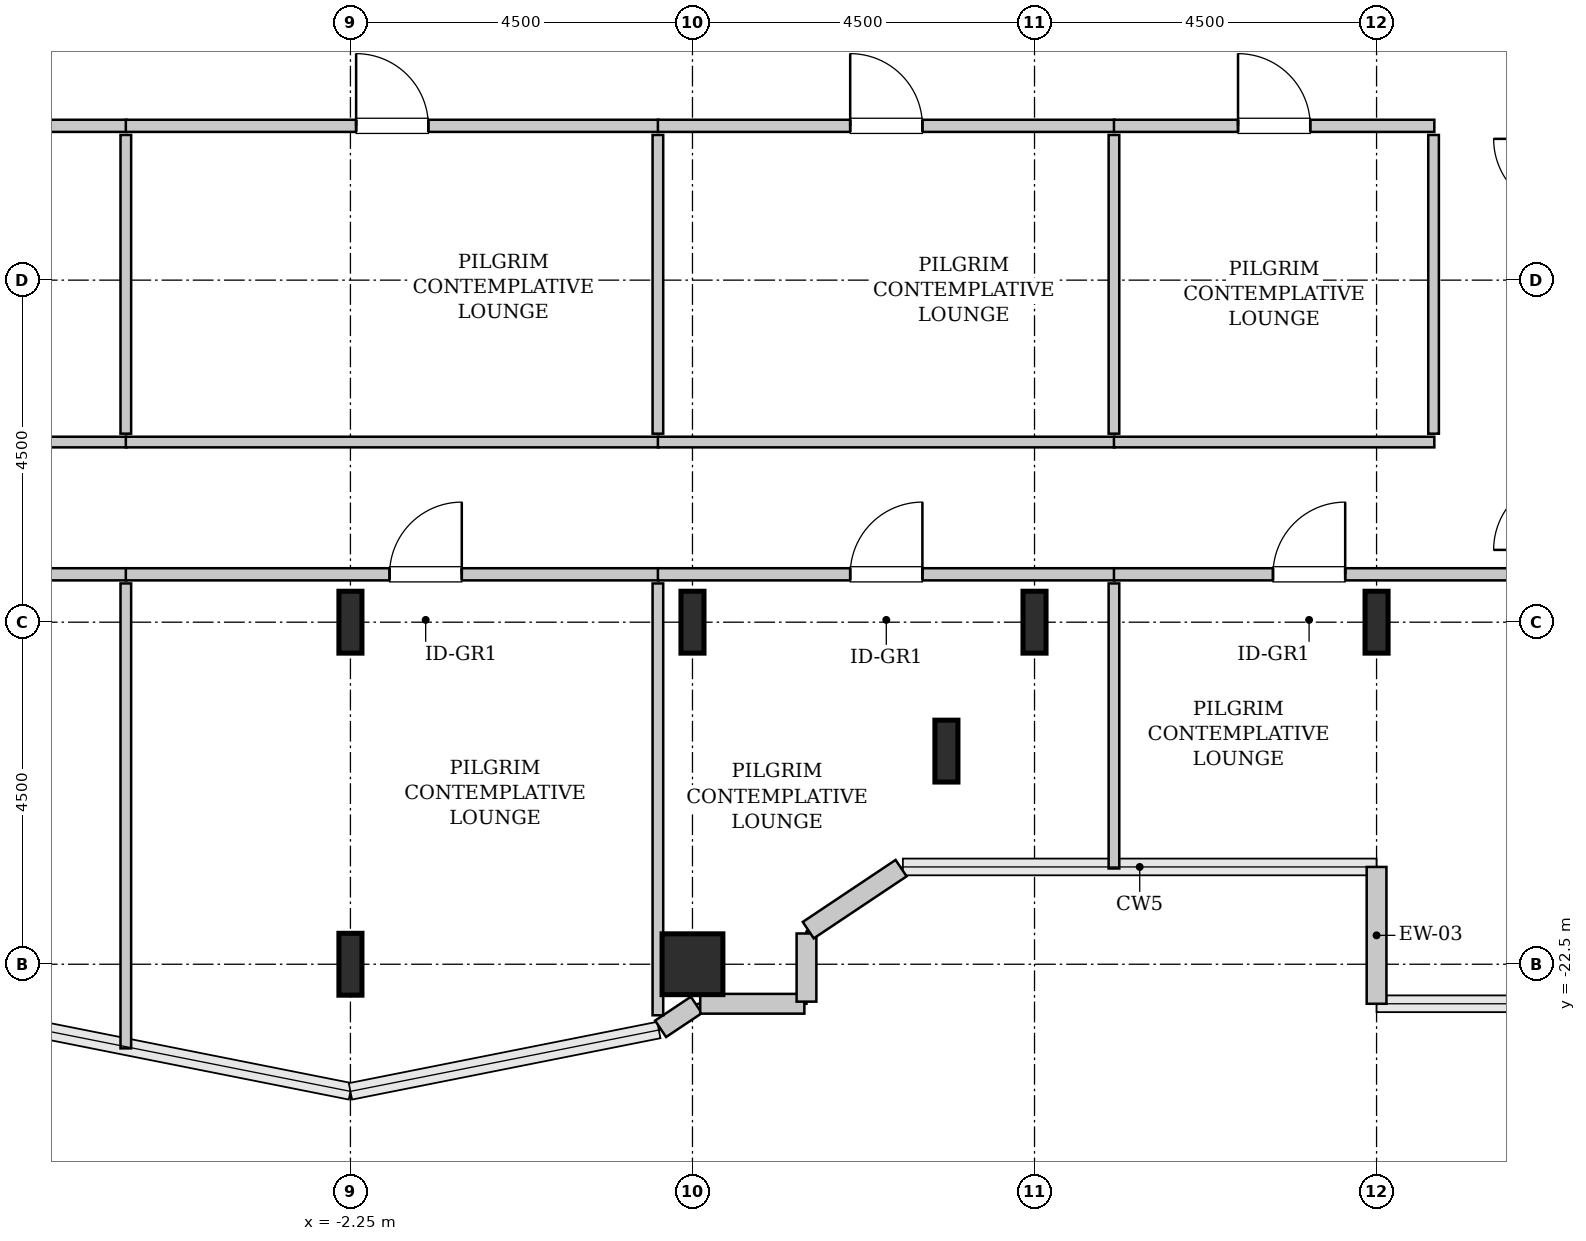
"""IFC4 building model, lengths in metres.
Left out: names, types, materials, properties, quantities, classifications, styles, units other than length and angle.
Written with IfcOpenShell. Run it as: python <this file> out.ifc"""

import sys

from ifc_helpers import new_model, si_unit, direction, frame, frame_2d, origin, origin_2d, place, context, subcontext, project, spatial, rectangle, hollow_rectangle, i_section, extrude, source, transform, mapped, element, fill, save


model = new_model("IFC4")
c1 = context("Model", 3, precision=1e-05, world=origin(), true_north=direction((0.0, 1.0)))
c2 = subcontext(c1, "Body", "Model", "MODEL_VIEW")
j1 = project(units=[si_unit("LENGTHUNIT", "METRE"), si_unit("PLANEANGLEUNIT", "RADIAN")], contexts=[c1])
p1 = place(None, origin())
s1 = spatial("IfcSite", under=j1, at=p1, CompositionType="ELEMENT")
p2 = place(p1, origin())
s2 = spatial("IfcBuilding", under=s1, at=p2, CompositionType="ELEMENT")
p3 = place(p2, frame((0.0, 0.0, 175.4)))
s3 = spatial("IfcBuildingStorey", under=s2, at=p3, CompositionType="ELEMENT", Elevation=175.4)
m1 = source(origin(), c2, "Body", "SweptSolid", [
    extrude(i_section(OverallWidth=0.303, OverallDepth=0.814, WebThickness=0.021, FlangeThickness=0.04, FilletRadius=0.03, at=origin_2d()), origin(), (0.0, 0.0, 1.0), 3.8),
])
for number, where, z_axis, x_axis in (
    (1, (-2.25, -22.5, 0.0), (0.0, 0.0, 1.0), (1.0, 0.0, 0.0)),
    (2, (-2.25, -18.0, 0.0), (0.0, 0.0, 1.0), (1.0, 0.0, 0.0)),
):
    element("IfcColumn", number, at=place(p3, frame(where, z_axis=z_axis, x_axis=x_axis)), inside=s3, PredefinedType="COLUMN", context=c2, shape_type="MappedRepresentation", body=[
        mapped(m1, transform((0.0, 0.0, 0.0), x_axis=(1.0, 0.0, 0.0), y_axis=(0.0, 1.0, 0.0), z_axis=(0.0, 0.0, 1.0), scale=1.0)),
    ])
m2 = source(origin(), c2, "Body", "SweptSolid", [
    extrude(hollow_rectangle(XDim=0.8, YDim=0.8, WallThickness=0.04, InnerFilletRadius=0.04, OuterFilletRadius=0.08, at=origin_2d()), origin(), (0.0, 0.0, 1.0), 3.8),
])
p4 = place(p3, frame((2.25, -22.5, 0.0), z_axis=(0.0, 0.0, 1.0), x_axis=(1.0, 0.0, 0.0)))
e3 = element("IfcColumn", 3, at=p4, inside=s3, PredefinedType="COLUMN", context=c2, shape_type="MappedRepresentation", body=[
    mapped(m2, transform((0.0, 0.0, 0.0), x_axis=(1.0, 0.0, 0.0), y_axis=(0.0, 1.0, 0.0), z_axis=(0.0, 0.0, 1.0), scale=1.0)),
])
for number, where, z_axis, x_axis in (
    (4, (2.25, -18.0, 0.0), (0.0, 0.0, 1.0), (1.0, 0.0, 0.0)),
    (5, (5.591, -19.696, 0.0), (0.0, 0.0, 1.0), (1.0, 0.0, 0.0)),
    (6, (6.75, -18.0, 0.0), (0.0, 0.0, 1.0), (1.0, 0.0, 0.0)),
    (7, (11.25, -18.0, 0.0), (0.0, 0.0, 1.0), (1.0, 0.0, 0.0)),
):
    element("IfcColumn", number, at=place(p3, frame(where, z_axis=z_axis, x_axis=x_axis)), inside=s3, PredefinedType="COLUMN", context=c2, shape_type="MappedRepresentation", body=[
        mapped(m1, transform((0.0, 0.0, 0.0), x_axis=(1.0, 0.0, 0.0), y_axis=(0.0, 1.0, 0.0), z_axis=(0.0, 0.0, 1.0), scale=1.0)),
    ])
m3 = source(origin(), c2, "Body", "SweptSolid", [
    extrude(rectangle(XDim=1.8, YDim=0.26, at=frame_2d((0.9, 0.0))), origin(), (0.0, 0.0, 1.0), 3.55),
])
p5 = place(p3, frame((11.25, -21.22, 0.0), z_axis=(0.0, 0.0, 1.0), x_axis=(0.0, -1.0, 0.0)))
e8 = element("IfcWall", 8, at=p5, inside=s3, PredefinedType="SOLIDWALL", context=c2, shape_type="MappedRepresentation", body=[
    mapped(m3, transform((0.0, 0.0, 0.0), x_axis=(1.0, 0.0, 0.0), y_axis=(0.0, 1.0, 0.0), z_axis=(0.0, 0.0, 1.0), scale=1.0)),
])
m4 = source(origin(), c2, "Body", "SweptSolid", [
    extrude(rectangle(XDim=0.565, YDim=0.26, at=frame_2d((0.283, 0.0))), origin(), (0.0, 0.0, 1.0), 3.55),
])
p6 = place(p3, frame((1.831, -23.35, 0.0), z_axis=(0.0, 0.0, 1.0), x_axis=(0.831651492666, 0.555297933317, 0.0)))
e9 = element("IfcWall", 9, at=p6, inside=s3, PredefinedType="SOLIDWALL", context=c2, shape_type="MappedRepresentation", body=[
    mapped(m4, transform((0.0, 0.0, 0.0), x_axis=(1.0, 0.0, 0.0), y_axis=(0.0, 1.0, 0.0), z_axis=(0.0, 0.0, 1.0), scale=1.0)),
])
m5 = source(origin(), c2, "Body", "SweptSolid", [
    extrude(rectangle(XDim=1.37, YDim=0.26, at=frame_2d((0.685, 0.0))), origin(), (0.0, 0.0, 1.0), 3.55),
])
p7 = place(p3, frame((2.352, -23.02, 0.0), z_axis=(0.0, 0.0, 1.0), x_axis=(1.0, 0.0, 0.0)))
e10 = element("IfcWall", 10, at=p7, inside=s3, PredefinedType="SOLIDWALL", context=c2, shape_type="MappedRepresentation", body=[
    mapped(m5, transform((0.0, 0.0, 0.0), x_axis=(1.0, 0.0, 0.0), y_axis=(0.0, 1.0, 0.0), z_axis=(0.0, 0.0, 1.0), scale=1.0)),
])
m6 = source(origin(), c2, "Body", "SweptSolid", [
    extrude(rectangle(XDim=0.897, YDim=0.26, at=frame_2d((0.448, 0.0))), origin(), (0.0, 0.0, 1.0), 3.55),
])
p8 = place(p3, frame((3.75, -22.992, 0.0), z_axis=(0.0, 0.0, 1.0), x_axis=(0.0, 1.0, 0.0)))
e11 = element("IfcWall", 11, at=p8, inside=s3, PredefinedType="SOLIDWALL", context=c2, shape_type="MappedRepresentation", body=[
    mapped(m6, transform((0.0, 0.0, 0.0), x_axis=(1.0, 0.0, 0.0), y_axis=(0.0, 1.0, 0.0), z_axis=(0.0, 0.0, 1.0), scale=1.0)),
])
m7 = source(origin(), c2, "Body", "SweptSolid", [
    extrude(rectangle(XDim=1.469, YDim=0.26, at=frame_2d((0.734, 0.0))), origin(), (0.0, 0.0, 1.0), 3.55),
])
p9 = place(p3, frame((3.773, -22.052, 0.0), z_axis=(0.0, 0.0, 1.0), x_axis=(0.831461760506, 0.555581983884, 0.0)))
e12 = element("IfcWall", 12, at=p9, inside=s3, PredefinedType="SOLIDWALL", context=c2, shape_type="MappedRepresentation", body=[
    mapped(m7, transform((0.0, 0.0, 0.0), x_axis=(1.0, 0.0, 0.0), y_axis=(0.0, 1.0, 0.0), z_axis=(0.0, 0.0, 1.0), scale=1.0)),
])
m8 = source(origin(), c2, "Body", "SweptSolid", [
    extrude(rectangle(XDim=4.61, YDim=0.16, at=frame_2d((2.305, 0.0))), origin(), (0.0, 0.0, 1.0), 3.535),
])
p10 = place(p3, frame((-9.805, -17.37, 0.0), z_axis=(0.0, 0.0, 1.0), x_axis=(1.0, 0.0, 0.0)))
e13 = element("IfcWall", 13, at=p10, inside=s3, PredefinedType="PARTITIONING", context=c2, shape_type="MappedRepresentation", body=[
    mapped(m8, transform((0.0, 0.0, 0.0), x_axis=(1.0, 0.0, 0.0), y_axis=(0.0, 1.0, 0.0), z_axis=(0.0, 0.0, 1.0), scale=1.0)),
])
p11 = place(p10, frame((1.582, 0.0, 0.0)))
e14 = element("IfcOpeningElement", 14, at=p11, cuts=e13, PredefinedType="OPENING", context=c2, shape_type="SweptSolid", body=[
    extrude(rectangle(XDim=0.95, YDim=2.1, at=frame_2d((0.475, 1.05))), frame((0.0, 0.09, 0.0), z_axis=(0.0, -1.0, 0.0), x_axis=(1.0, 0.0, 0.0)), (0.0, 0.0, 1.0), 0.18),
])
m9 = source(origin(), c2, "Body", "SweptSolid", [
    extrude(rectangle(XDim=6.117, YDim=0.14, at=frame_2d((3.059, 0.0))), origin(), (0.0, 0.0, 1.0), 3.535),
])
p12 = place(p3, frame((-5.205, -23.607, 0.0), z_axis=(0.0, 0.0, 1.0), x_axis=(0.0, 1.0, 0.0)))
e15 = element("IfcWall", 15, at=p12, inside=s3, PredefinedType="PARTITIONING", context=c2, shape_type="MappedRepresentation", body=[
    mapped(m9, transform((0.0, 0.0, 0.0), x_axis=(1.0, 0.0, 0.0), y_axis=(0.0, 1.0, 0.0), z_axis=(0.0, 0.0, 1.0), scale=1.0)),
])
m10 = source(origin(), c2, "Body", "SweptSolid", [
    extrude(rectangle(XDim=4.5, YDim=0.16, at=frame_2d((2.25, 0.0))), origin(), (0.0, 0.0, 1.0), 3.535),
])
p13 = place(p3, frame((-9.695, -11.47, 0.0), z_axis=(0.0, 0.0, 1.0), x_axis=(1.0, 0.0, 0.0)))
e16 = element("IfcWall", 16, at=p13, inside=s3, PredefinedType="PARTITIONING", context=c2, shape_type="MappedRepresentation", body=[
    mapped(m10, transform((0.0, 0.0, 0.0), x_axis=(1.0, 0.0, 0.0), y_axis=(0.0, 1.0, 0.0), z_axis=(0.0, 0.0, 1.0), scale=1.0)),
])
p14 = place(p13, frame((1.775, 0.0, 0.0)))
e17 = element("IfcOpeningElement", 17, at=p14, cuts=e16, PredefinedType="OPENING", context=c2, shape_type="SweptSolid", body=[
    extrude(rectangle(XDim=0.95, YDim=2.1, at=frame_2d((0.475, 1.05))), frame((0.0, 0.09, 0.0), z_axis=(0.0, -1.0, 0.0), x_axis=(1.0, 0.0, 0.0)), (0.0, 0.0, 1.0), 0.18),
])
m11 = source(origin(), c2, "Body", "SweptSolid", [
    extrude(rectangle(XDim=4.5, YDim=0.14, at=frame_2d((2.25, 0.0))), origin(), (0.0, 0.0, 1.0), 3.535),
])
p15 = place(p3, frame((-9.695, -15.63, 0.0), z_axis=(0.0, 0.0, 1.0), x_axis=(1.0, 0.0, 0.0)))
e18 = element("IfcWall", 18, at=p15, inside=s3, PredefinedType="PARTITIONING", context=c2, shape_type="MappedRepresentation", body=[
    mapped(m11, transform((0.0, 0.0, 0.0), x_axis=(1.0, 0.0, 0.0), y_axis=(0.0, 1.0, 0.0), z_axis=(0.0, 0.0, 1.0), scale=1.0)),
])
m12 = source(origin(), c2, "Body", "SweptSolid", [
    extrude(rectangle(XDim=3.93, YDim=0.14, at=frame_2d((1.965, 0.0))), origin(), (0.0, 0.0, 1.0), 3.535),
])
p16 = place(p3, frame((-5.205, -15.52, 0.0), z_axis=(0.0, 0.0, 1.0), x_axis=(0.0, 1.0, 0.0)))
e19 = element("IfcWall", 19, at=p16, inside=s3, PredefinedType="PARTITIONING", context=c2, shape_type="MappedRepresentation", body=[
    mapped(m12, transform((0.0, 0.0, 0.0), x_axis=(1.0, 0.0, 0.0), y_axis=(0.0, 1.0, 0.0), z_axis=(0.0, 0.0, 1.0), scale=1.0)),
])
m13 = source(origin(), c2, "Body", "SweptSolid", [
    extrude(rectangle(XDim=7.01, YDim=0.16, at=frame_2d((3.505, 0.0))), origin(), (0.0, 0.0, 1.0), 3.535),
])
p17 = place(p3, frame((-5.205, -17.37, 0.0), z_axis=(0.0, 0.0, 1.0), x_axis=(1.0, 0.0, 0.0)))
e20 = element("IfcWall", 20, at=p17, inside=s3, PredefinedType="PARTITIONING", context=c2, shape_type="MappedRepresentation", body=[
    mapped(m13, transform((0.0, 0.0, 0.0), x_axis=(1.0, 0.0, 0.0), y_axis=(0.0, 1.0, 0.0), z_axis=(0.0, 0.0, 1.0), scale=1.0)),
])
p18 = place(p17, frame((3.47, 0.0, 0.0)))
e21 = element("IfcOpeningElement", 21, at=p18, cuts=e20, PredefinedType="OPENING", context=c2, shape_type="SweptSolid", body=[
    extrude(rectangle(XDim=0.95, YDim=2.1, at=frame_2d((0.475, 1.05))), frame((0.0, 0.09, 0.0), z_axis=(0.0, -1.0, 0.0), x_axis=(1.0, 0.0, 0.0)), (0.0, 0.0, 1.0), 0.18),
])
m14 = source(origin(), c2, "Body", "SweptSolid", [
    extrude(rectangle(XDim=5.681, YDim=0.14, at=frame_2d((2.841, 0.0))), origin(), (0.0, 0.0, 1.0), 2.875),
])
p19 = place(p3, frame((1.795, -23.171, 0.0), z_axis=(0.0, 0.0, 1.0), x_axis=(0.0, 1.0, 0.0)))
e22 = element("IfcWall", 22, at=p19, inside=s3, PredefinedType="PARTITIONING", context=c2, shape_type="MappedRepresentation", body=[
    mapped(m14, transform((0.0, 0.0, 0.0), x_axis=(1.0, 0.0, 0.0), y_axis=(0.0, 1.0, 0.0), z_axis=(0.0, 0.0, 1.0), scale=1.0)),
])
p20 = place(p3, frame((-5.205, -11.47, 0.0), z_axis=(0.0, 0.0, 1.0), x_axis=(1.0, 0.0, 0.0)))
e23 = element("IfcWall", 23, at=p20, inside=s3, PredefinedType="PARTITIONING", context=c2, shape_type="MappedRepresentation", body=[
    mapped(m13, transform((0.0, 0.0, 0.0), x_axis=(1.0, 0.0, 0.0), y_axis=(0.0, 1.0, 0.0), z_axis=(0.0, 0.0, 1.0), scale=1.0)),
])
p21 = place(p20, frame((3.03, 0.0, 0.0)))
e24 = element("IfcOpeningElement", 24, at=p21, cuts=e23, PredefinedType="OPENING", context=c2, shape_type="SweptSolid", body=[
    extrude(rectangle(XDim=0.95, YDim=2.1, at=frame_2d((0.475, 1.05))), frame((0.0, 0.09, 0.0), z_axis=(0.0, -1.0, 0.0), x_axis=(1.0, 0.0, 0.0)), (0.0, 0.0, 1.0), 0.18),
])
m15 = source(origin(), c2, "Body", "SweptSolid", [
    extrude(rectangle(XDim=7.01, YDim=0.14, at=frame_2d((3.505, 0.0))), origin(), (0.0, 0.0, 1.0), 3.535),
])
p22 = place(p3, frame((-5.205, -15.63, 0.0), z_axis=(0.0, 0.0, 1.0), x_axis=(1.0, 0.0, 0.0)))
e25 = element("IfcWall", 25, at=p22, inside=s3, PredefinedType="PARTITIONING", context=c2, shape_type="MappedRepresentation", body=[
    mapped(m15, transform((0.0, 0.0, 0.0), x_axis=(1.0, 0.0, 0.0), y_axis=(0.0, 1.0, 0.0), z_axis=(0.0, 0.0, 1.0), scale=1.0)),
])
p23 = place(p3, frame((1.795, -15.52, 0.0), z_axis=(0.0, 0.0, 1.0), x_axis=(0.0, 1.0, 0.0)))
e26 = element("IfcWall", 26, at=p23, inside=s3, PredefinedType="PARTITIONING", context=c2, shape_type="MappedRepresentation", body=[
    mapped(m12, transform((0.0, 0.0, 0.0), x_axis=(1.0, 0.0, 0.0), y_axis=(0.0, 1.0, 0.0), z_axis=(0.0, 0.0, 1.0), scale=1.0)),
])
m16 = source(origin(), c2, "Body", "SweptSolid", [
    extrude(rectangle(XDim=6.01, YDim=0.16, at=frame_2d((3.005, 0.0))), origin(), (0.0, 0.0, 1.0), 3.535),
])
p24 = place(p3, frame((1.795, -17.37, 0.0), z_axis=(0.0, 0.0, 1.0), x_axis=(1.0, 0.0, 0.0)))
e27 = element("IfcWall", 27, at=p24, inside=s3, PredefinedType="PARTITIONING", context=c2, shape_type="MappedRepresentation", body=[
    mapped(m16, transform((0.0, 0.0, 0.0), x_axis=(1.0, 0.0, 0.0), y_axis=(0.0, 1.0, 0.0), z_axis=(0.0, 0.0, 1.0), scale=1.0)),
])
p25 = place(p24, frame((2.53, 0.0, 0.0)))
e28 = element("IfcOpeningElement", 28, at=p25, cuts=e27, PredefinedType="OPENING", context=c2, shape_type="SweptSolid", body=[
    extrude(rectangle(XDim=0.95, YDim=2.1, at=frame_2d((0.475, 1.05))), frame((0.0, 0.09, 0.0), z_axis=(0.0, -1.0, 0.0), x_axis=(1.0, 0.0, 0.0)), (0.0, 0.0, 1.0), 0.18),
])
m17 = source(origin(), c2, "Body", "SweptSolid", [
    extrude(rectangle(XDim=3.75, YDim=0.14, at=frame_2d((1.875, 0.0))), origin(), (0.0, 0.0, 1.0), 3.535),
])
p26 = place(p3, frame((7.795, -21.24, 0.0), z_axis=(0.0, 0.0, 1.0), x_axis=(0.0, 1.0, 0.0)))
e29 = element("IfcWall", 29, at=p26, inside=s3, PredefinedType="PARTITIONING", context=c2, shape_type="MappedRepresentation", body=[
    mapped(m17, transform((0.0, 0.0, 0.0), x_axis=(1.0, 0.0, 0.0), y_axis=(0.0, 1.0, 0.0), z_axis=(0.0, 0.0, 1.0), scale=1.0)),
])
p27 = place(p3, frame((1.795, -11.47, 0.0), z_axis=(0.0, 0.0, 1.0), x_axis=(1.0, 0.0, 0.0)))
e30 = element("IfcWall", 30, at=p27, inside=s3, PredefinedType="PARTITIONING", context=c2, shape_type="MappedRepresentation", body=[
    mapped(m16, transform((0.0, 0.0, 0.0), x_axis=(1.0, 0.0, 0.0), y_axis=(0.0, 1.0, 0.0), z_axis=(0.0, 0.0, 1.0), scale=1.0)),
])
p28 = place(p27, frame((2.53, 0.0, 0.0)))
e31 = element("IfcOpeningElement", 31, at=p28, cuts=e30, PredefinedType="OPENING", context=c2, shape_type="SweptSolid", body=[
    extrude(rectangle(XDim=0.95, YDim=2.1, at=frame_2d((0.475, 1.05))), frame((0.0, 0.09, 0.0), z_axis=(0.0, -1.0, 0.0), x_axis=(1.0, 0.0, 0.0)), (0.0, 0.0, 1.0), 0.18),
])
m18 = source(origin(), c2, "Body", "SweptSolid", [
    extrude(rectangle(XDim=6.01, YDim=0.14, at=frame_2d((3.005, 0.0))), origin(), (0.0, 0.0, 1.0), 3.535),
])
p29 = place(p3, frame((1.795, -15.63, 0.0), z_axis=(0.0, 0.0, 1.0), x_axis=(1.0, 0.0, 0.0)))
e32 = element("IfcWall", 32, at=p29, inside=s3, PredefinedType="PARTITIONING", context=c2, shape_type="MappedRepresentation", body=[
    mapped(m18, transform((0.0, 0.0, 0.0), x_axis=(1.0, 0.0, 0.0), y_axis=(0.0, 1.0, 0.0), z_axis=(0.0, 0.0, 1.0), scale=1.0)),
])
p30 = place(p3, frame((7.795, -15.52, 0.0), z_axis=(0.0, 0.0, 1.0), x_axis=(0.0, 1.0, 0.0)))
e33 = element("IfcWall", 33, at=p30, inside=s3, PredefinedType="PARTITIONING", context=c2, shape_type="MappedRepresentation", body=[
    mapped(m12, transform((0.0, 0.0, 0.0), x_axis=(1.0, 0.0, 0.0), y_axis=(0.0, 1.0, 0.0), z_axis=(0.0, 0.0, 1.0), scale=1.0)),
])
m19 = source(origin(), c2, "Body", "SweptSolid", [
    extrude(rectangle(XDim=5.825, YDim=0.16, at=frame_2d((2.913, 0.0))), origin(), (0.0, 0.0, 1.0), 3.535),
])
p31 = place(p3, frame((7.795, -17.37, 0.0), z_axis=(0.0, 0.0, 1.0), x_axis=(1.0, 0.0, 0.0)))
e34 = element("IfcWall", 34, at=p31, inside=s3, PredefinedType="PARTITIONING", context=c2, shape_type="MappedRepresentation", body=[
    mapped(m19, transform((0.0, 0.0, 0.0), x_axis=(1.0, 0.0, 0.0), y_axis=(0.0, 1.0, 0.0), z_axis=(0.0, 0.0, 1.0), scale=1.0)),
])
p32 = place(p31, frame((2.092, 0.0, 0.0)))
e35 = element("IfcOpeningElement", 35, at=p32, cuts=e34, PredefinedType="OPENING", context=c2, shape_type="SweptSolid", body=[
    extrude(rectangle(XDim=0.95, YDim=2.1, at=frame_2d((0.475, 1.05))), frame((0.0, 0.09, 0.0), z_axis=(0.0, -1.0, 0.0), x_axis=(1.0, 0.0, 0.0)), (0.0, 0.0, 1.0), 0.18),
])
m20 = source(origin(), c2, "Body", "SweptSolid", [
    extrude(rectangle(XDim=4.215, YDim=0.16, at=frame_2d((2.107, 0.0))), origin(), (0.0, 0.0, 1.0), 3.535),
])
p33 = place(p3, frame((7.795, -11.47, 0.0), z_axis=(0.0, 0.0, 1.0), x_axis=(1.0, 0.0, 0.0)))
e36 = element("IfcWall", 36, at=p33, inside=s3, PredefinedType="PARTITIONING", context=c2, shape_type="MappedRepresentation", body=[
    mapped(m20, transform((0.0, 0.0, 0.0), x_axis=(1.0, 0.0, 0.0), y_axis=(0.0, 1.0, 0.0), z_axis=(0.0, 0.0, 1.0), scale=1.0)),
])
p34 = place(p33, frame((1.633, 0.0, 0.0)))
e37 = element("IfcOpeningElement", 37, at=p34, cuts=e36, PredefinedType="OPENING", context=c2, shape_type="SweptSolid", body=[
    extrude(rectangle(XDim=0.95, YDim=2.1, at=frame_2d((0.475, 1.05))), frame((0.0, 0.09, 0.0), z_axis=(0.0, -1.0, 0.0), x_axis=(1.0, 0.0, 0.0)), (0.0, 0.0, 1.0), 0.18),
])
m21 = source(origin(), c2, "Body", "SweptSolid", [
    extrude(rectangle(XDim=4.215, YDim=0.14, at=frame_2d((2.107, 0.0))), origin(), (0.0, 0.0, 1.0), 3.535),
])
p35 = place(p3, frame((7.795, -15.63, 0.0), z_axis=(0.0, 0.0, 1.0), x_axis=(1.0, 0.0, 0.0)))
e38 = element("IfcWall", 38, at=p35, inside=s3, PredefinedType="PARTITIONING", context=c2, shape_type="MappedRepresentation", body=[
    mapped(m21, transform((0.0, 0.0, 0.0), x_axis=(1.0, 0.0, 0.0), y_axis=(0.0, 1.0, 0.0), z_axis=(0.0, 0.0, 1.0), scale=1.0)),
])
p36 = place(p3, frame((12.0, -15.52, 0.0), z_axis=(0.0, 0.0, 1.0), x_axis=(0.0, 1.0, 0.0)))
e39 = element("IfcWall", 39, at=p36, inside=s3, PredefinedType="PARTITIONING", context=c2, shape_type="MappedRepresentation", body=[
    mapped(m12, transform((0.0, 0.0, 0.0), x_axis=(1.0, 0.0, 0.0), y_axis=(0.0, 1.0, 0.0), z_axis=(0.0, 0.0, 1.0), scale=1.0)),
])
m22 = source(origin(), c2, "Body", "SweptSolid", [
    extrude(rectangle(XDim=0.95, YDim=2.1, at=frame_2d((0.475, 1.05))), frame((0.0, 0.025, 0.0), z_axis=(0.0, -1.0, 0.0), x_axis=(1.0, 0.0, 0.0)), (0.0, 0.0, 1.0), 0.05),
])
p37 = place(p18, origin())
e40 = element("IfcDoor", 40, at=p37, inside=s3, OperationType="SINGLE_SWING_RIGHT", PredefinedType="DOOR", context=c2, shape_type="MappedRepresentation", body=[
    mapped(m22, transform((0.0, 0.0, 0.0), x_axis=(1.0, 0.0, 0.0), y_axis=(0.0, 1.0, 0.0), z_axis=(0.0, 0.0, 1.0), scale=1.0)),
])
fill(e21, e40)
p38 = place(p21, origin())
e41 = element("IfcDoor", 41, at=p38, inside=s3, OperationType="SINGLE_SWING_LEFT", PredefinedType="DOOR", context=c2, shape_type="MappedRepresentation", body=[
    mapped(m22, transform((0.0, 0.0, 0.0), x_axis=(1.0, 0.0, 0.0), y_axis=(0.0, 1.0, 0.0), z_axis=(0.0, 0.0, 1.0), scale=1.0)),
])
fill(e24, e41)
p39 = place(p25, origin())
e42 = element("IfcDoor", 42, at=p39, inside=s3, OperationType="SINGLE_SWING_RIGHT", PredefinedType="DOOR", context=c2, shape_type="MappedRepresentation", body=[
    mapped(m22, transform((0.0, 0.0, 0.0), x_axis=(1.0, 0.0, 0.0), y_axis=(0.0, 1.0, 0.0), z_axis=(0.0, 0.0, 1.0), scale=1.0)),
])
fill(e28, e42)
p40 = place(p28, origin())
e43 = element("IfcDoor", 43, at=p40, inside=s3, OperationType="SINGLE_SWING_LEFT", PredefinedType="DOOR", context=c2, shape_type="MappedRepresentation", body=[
    mapped(m22, transform((0.0, 0.0, 0.0), x_axis=(1.0, 0.0, 0.0), y_axis=(0.0, 1.0, 0.0), z_axis=(0.0, 0.0, 1.0), scale=1.0)),
])
fill(e31, e43)
p41 = place(p32, origin())
e44 = element("IfcDoor", 44, at=p41, inside=s3, OperationType="SINGLE_SWING_RIGHT", PredefinedType="DOOR", context=c2, shape_type="MappedRepresentation", body=[
    mapped(m22, transform((0.0, 0.0, 0.0), x_axis=(1.0, 0.0, 0.0), y_axis=(0.0, 1.0, 0.0), z_axis=(0.0, 0.0, 1.0), scale=1.0)),
])
fill(e35, e44)
p42 = place(p34, origin())
e45 = element("IfcDoor", 45, at=p42, inside=s3, OperationType="SINGLE_SWING_LEFT", PredefinedType="DOOR", context=c2, shape_type="MappedRepresentation", body=[
    mapped(m22, transform((0.0, 0.0, 0.0), x_axis=(1.0, 0.0, 0.0), y_axis=(0.0, 1.0, 0.0), z_axis=(0.0, 0.0, 1.0), scale=1.0)),
])
fill(e37, e45)
save(model, sys.argv[1])
